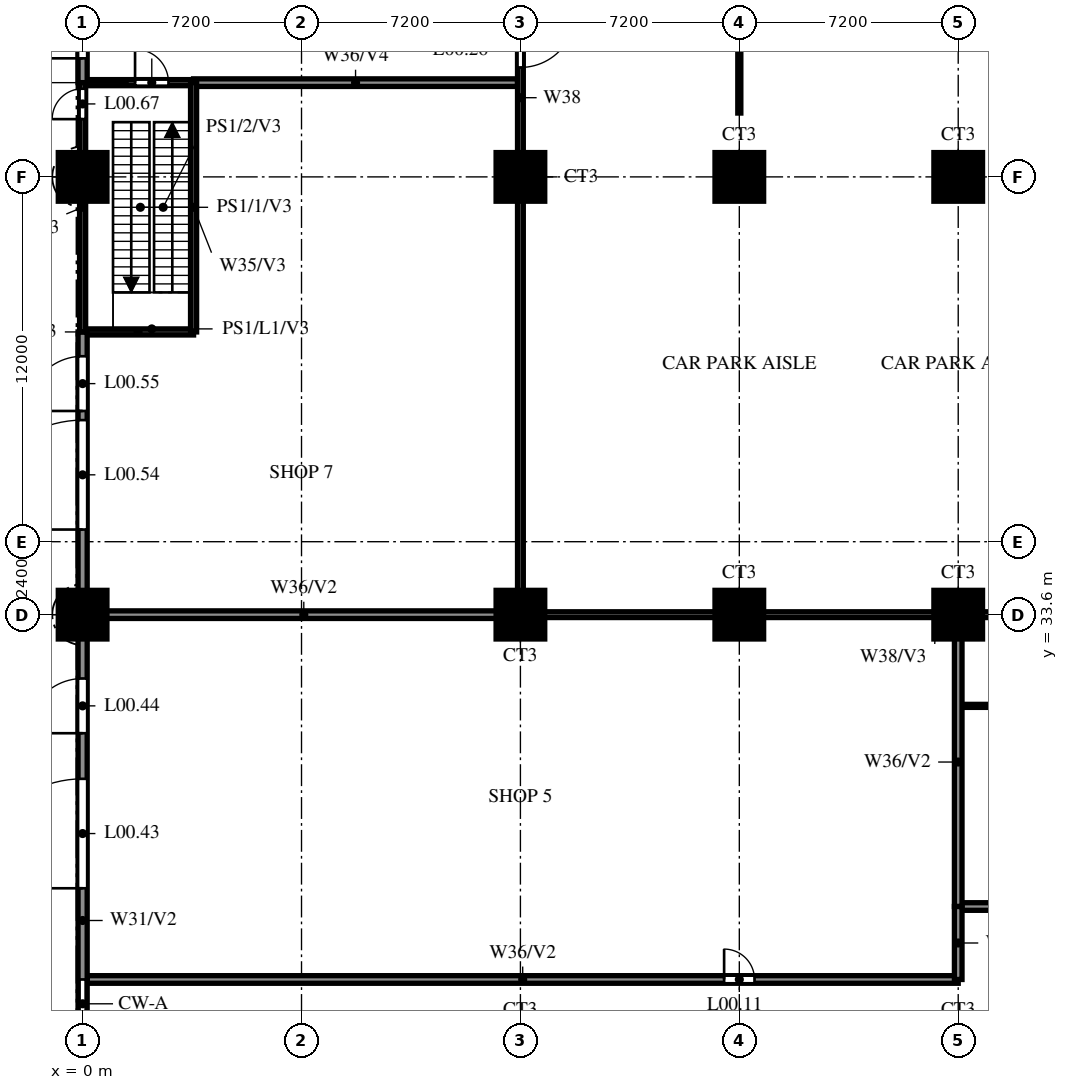
"""IFC4 building model, lengths in metres.
Left out: names, types, materials, properties, quantities, classifications, styles, units other than length and angle.
Written with IfcOpenShell. Run it as: python <this file> out.ifc"""

import sys

from ifc_helpers import new_model, si_unit, direction, frame, frame_2d, origin, origin_2d, place, context, subcontext, project, spatial, rectangle, circle, extrude, source, transform, mapped, element, fill, save


model = new_model("IFC4")
c1 = context("Model", 3, precision=1e-05, world=origin(), true_north=direction((0.0, 1.0)))
c2 = subcontext(c1, "Body", "Model", "MODEL_VIEW")
j1 = project(units=[si_unit("LENGTHUNIT", "METRE"), si_unit("PLANEANGLEUNIT", "RADIAN")], contexts=[c1])
p1 = place(None, origin())
s1 = spatial("IfcSite", under=j1, at=p1, CompositionType="ELEMENT")
p2 = place(p1, origin())
s2 = spatial("IfcBuilding", under=s1, at=p2, CompositionType="ELEMENT")
p3 = place(p2, origin())
s3 = spatial("IfcBuildingStorey", under=s2, at=p3, CompositionType="ELEMENT", Elevation=0.0)
m1 = source(origin(), c2, "Body", "SweptSolid", [
    extrude(circle(Radius=0.8, at=origin_2d()), origin(), (0.0, 0.0, 1.0), 7.4),
])
for number, where, z_axis, x_axis in (
    (1, (0.0, 33.6, 0.0), (0.0, 0.0, 1.0), (1.0, 0.0, 0.0)),
    (2, (14.4, 33.6, 0.0), (0.0, 0.0, 1.0), (1.0, 0.0, 0.0)),
    (3, (21.6, 33.6, 0.0), (0.0, 0.0, 1.0), (1.0, 0.0, 0.0)),
    (4, (28.8, 33.6, 0.0), (0.0, 0.0, 1.0), (1.0, 0.0, 0.0)),
    (5, (0.0, 48.0, 0.0), (0.0, 0.0, 1.0), (1.0, 0.0, 0.0)),
    (6, (14.4, 48.0, 0.0), (0.0, 0.0, 1.0), (1.0, 0.0, 0.0)),
    (7, (21.6, 48.0, 0.0), (0.0, 0.0, 1.0), (1.0, 0.0, 0.0)),
    (8, (28.8, 48.0, 0.0), (0.0, 0.0, 1.0), (1.0, 0.0, 0.0)),
):
    element("IfcColumn", number, at=place(p3, frame(where, z_axis=z_axis, x_axis=x_axis)), inside=s3, PredefinedType="COLUMN", context=c2, shape_type="MappedRepresentation", body=[
        mapped(m1, transform((0.0, 0.0, 0.0))),
    ])
p4 = place(p3, frame((0.15, 21.6, 0.0), z_axis=(0.0, 0.0, 1.0), x_axis=(1.0, 0.0, 0.0)))
e9 = element("IfcWall", 9, at=p4, inside=s3, PredefinedType="SOLIDWALL", context=c2, shape_type="SweptSolid", body=[
    extrude(rectangle(XDim=28.65, YDim=0.25, at=frame_2d((14.325, 0.0))), origin(), (0.0, 0.0, 1.0), 6.2),
])
p5 = place(p4, frame((20.95, 0.0, 0.0)))
e10 = element("IfcOpeningElement", 10, at=p5, cuts=e9, PredefinedType="OPENING", context=c2, shape_type="SweptSolid", body=[
    extrude(rectangle(XDim=1.0, YDim=2.1, at=frame_2d((0.5, 1.05))), frame((0.0, 0.135, 0.0), z_axis=(0.0, -1.0, 0.0), x_axis=(1.0, 0.0, 0.0)), (0.0, 0.0, 1.0), 0.27),
])
p6 = place(p3, frame((28.8, 24.0, 0.0), z_axis=(0.0, 0.0, 1.0), x_axis=(1.0, 0.0, 0.0)))
e11 = element("IfcWall", 11, at=p6, inside=s3, PredefinedType="SOLIDWALL", context=c2, shape_type="SweptSolid", body=[
    extrude(rectangle(XDim=14.4, YDim=0.25, at=frame_2d((7.2, 0.0))), origin(), (0.0, 0.0, 1.0), 6.2),
])
p7 = place(p6, frame((6.65, 0.0, 0.0)))
e12 = element("IfcOpeningElement", 12, at=p7, cuts=e11, PredefinedType="OPENING", context=c2, shape_type="SweptSolid", body=[
    extrude(rectangle(XDim=1.1, YDim=2.1, at=frame_2d((0.55, 1.05))), frame((0.0, 0.135, 0.0), z_axis=(0.0, -1.0, 0.0), x_axis=(1.0, 0.0, 0.0)), (0.0, 0.0, 1.0), 0.27),
])
p8 = place(p3, frame((28.925, 30.6, 0.0), z_axis=(0.0, 0.0, 1.0), x_axis=(1.0, 0.0, 0.0)))
e13 = element("IfcWall", 13, at=p8, inside=s3, PredefinedType="PARTITIONING", context=c2, shape_type="SweptSolid", body=[
    extrude(rectangle(XDim=4.625, YDim=0.1, at=frame_2d((2.312, 0.0))), origin(), (0.0, 0.0, 1.0), 7.4),
])
p9 = place(p3, frame((14.4, 33.6, 0.0), z_axis=(0.0, 0.0, 1.0), x_axis=(1.0, 0.0, 0.0)))
e14 = element("IfcWall", 14, at=p9, inside=s3, PredefinedType="PARTITIONING", context=c2, shape_type="SweptSolid", body=[
    extrude(rectangle(XDim=28.8, YDim=0.19, at=frame_2d((14.4, 0.0))), origin(), (0.0, 0.0, 1.0), 6.5),
])
p10 = place(p3, frame((0.15, 33.6, 0.0), z_axis=(0.0, 0.0, 1.0), x_axis=(1.0, 0.0, 0.0)))
e15 = element("IfcWall", 15, at=p10, inside=s3, PredefinedType="SOLIDWALL", context=c2, shape_type="SweptSolid", body=[
    extrude(rectangle(XDim=14.25, YDim=0.25, at=frame_2d((7.125, 0.0))), origin(), (0.0, 0.0, 1.0), 6.2),
])
p11 = place(p3, frame((0.0, 42.9, 0.0), z_axis=(0.0, 0.0, 1.0), x_axis=(1.0, 0.0, 0.0)))
e16 = element("IfcWall", 16, at=p11, inside=s3, PredefinedType="SOLIDWALL", context=c2, shape_type="SweptSolid", body=[
    extrude(rectangle(XDim=3.65, YDim=0.2, at=frame_2d((1.825, 0.0))), origin(), (0.0, 0.0, 1.0), 7.4),
])
p12 = place(p3, frame((3.65, 51.1, 0.0), z_axis=(0.0, 0.0, 1.0), x_axis=(1.0, 0.0, 0.0)))
e17 = element("IfcWall", 17, at=p12, inside=s3, PredefinedType="SOLIDWALL", context=c2, shape_type="SweptSolid", body=[
    extrude(rectangle(XDim=10.655, YDim=0.25, at=frame_2d((5.328, 0.0))), origin(), (0.0, 0.0, 1.0), 7.4),
])
p13 = place(p3, frame((0.0, 51.1, 0.0), z_axis=(0.0, 0.0, 1.0), x_axis=(1.0, 0.0, 0.0)))
e18 = element("IfcWall", 18, at=p13, inside=s3, PredefinedType="SOLIDWALL", context=c2, shape_type="SweptSolid", body=[
    extrude(rectangle(XDim=3.65, YDim=0.2, at=frame_2d((1.825, 0.0))), origin(), (0.0, 0.0, 1.0), 7.4),
])
p14 = place(p13, frame((1.725, 0.0, 0.0)))
e19 = element("IfcOpeningElement", 19, at=p14, cuts=e18, PredefinedType="OPENING", context=c2, shape_type="SweptSolid", body=[
    extrude(rectangle(XDim=1.1, YDim=2.1, at=frame_2d((0.55, 1.05))), frame((0.0, 0.11, 0.0), z_axis=(0.0, -1.0, 0.0), x_axis=(1.0, 0.0, 0.0)), (0.0, 0.0, 1.0), 0.22),
])
p15 = place(p3, frame((0.0, 7.7, 0.0), z_axis=(0.0, 0.0, 1.0), x_axis=(0.0, 1.0, 0.0)))
e20 = element("IfcWall", 20, at=p15, inside=s3, PredefinedType="SOLIDWALL", context=c2, shape_type="SweptSolid", body=[
    extrude(rectangle(XDim=35.2, YDim=0.3, at=frame_2d((17.6, 0.0))), origin(), (0.0, 0.0, 1.0), 7.4),
])
p16 = place(p15, frame((16.9, 0.0, 0.0)))
e21 = element("IfcOpeningElement", 21, at=p16, cuts=e20, PredefinedType="OPENING", context=c2, shape_type="SweptSolid", body=[
    extrude(rectangle(XDim=3.6, YDim=3.0, at=frame_2d((1.8, 1.5))), frame((0.0, 0.16, 0.0), z_axis=(0.0, -1.0, 0.0), x_axis=(1.0, 0.0, 0.0)), (0.0, 0.0, 1.0), 0.32),
])
p17 = place(p15, frame((22.0, 0.0, 0.0)))
e22 = element("IfcOpeningElement", 22, at=p17, cuts=e20, PredefinedType="OPENING", context=c2, shape_type="SweptSolid", body=[
    extrude(rectangle(XDim=1.8, YDim=2.1, at=frame_2d((0.9, 1.05))), frame((0.0, 0.16, 0.0), z_axis=(0.0, -1.0, 0.0), x_axis=(1.0, 0.0, 0.0)), (0.0, 0.0, 1.0), 0.32),
])
p18 = place(p15, frame((4.0, 0.0, 0.0)))
e23 = element("IfcOpeningElement", 23, at=p18, cuts=e20, PredefinedType="OPENING", context=c2, shape_type="SweptSolid", body=[
    extrude(rectangle(XDim=2.4, YDim=2.1, at=frame_2d((1.2, 1.05))), frame((0.0, 0.16, 0.0), z_axis=(0.0, -1.0, 0.0), x_axis=(1.0, 0.0, 0.0)), (0.0, 0.0, 1.0), 0.32),
])
p19 = place(p15, frame((7.0, 0.0, 0.0)))
e24 = element("IfcOpeningElement", 24, at=p19, cuts=e20, PredefinedType="OPENING", context=c2, shape_type="SweptSolid", body=[
    extrude(rectangle(XDim=2.4, YDim=2.1, at=frame_2d((1.2, 1.05))), frame((0.0, 0.16, 0.0), z_axis=(0.0, -1.0, 0.0), x_axis=(1.0, 0.0, 0.0)), (0.0, 0.0, 1.0), 0.32),
])
p20 = place(p15, frame((28.7, 0.0, 0.0)))
e25 = element("IfcOpeningElement", 25, at=p20, cuts=e20, PredefinedType="OPENING", context=c2, shape_type="SweptSolid", body=[
    extrude(rectangle(XDim=3.6, YDim=3.0, at=frame_2d((1.8, 1.5))), frame((0.0, 0.16, 0.0), z_axis=(0.0, -1.0, 0.0), x_axis=(1.0, 0.0, 0.0)), (0.0, 0.0, 1.0), 0.32),
])
p21 = place(p15, frame((32.6, 0.0, 0.0)))
e26 = element("IfcOpeningElement", 26, at=p21, cuts=e20, PredefinedType="OPENING", context=c2, shape_type="SweptSolid", body=[
    extrude(rectangle(XDim=1.8, YDim=2.1, at=frame_2d((0.9, 1.05))), frame((0.0, 0.16, 0.0), z_axis=(0.0, -1.0, 0.0), x_axis=(1.0, 0.0, 0.0)), (0.0, 0.0, 1.0), 0.32),
])
p22 = place(p3, frame((0.0, 51.1, 0.0), z_axis=(0.0, 0.0, 1.0), x_axis=(0.0, 1.0, 0.0)))
e27 = element("IfcWall", 27, at=p22, inside=s3, PredefinedType="SOLIDWALL", context=c2, shape_type="SweptSolid", body=[
    extrude(rectangle(XDim=3.2, YDim=0.3, at=frame_2d((1.6, 0.0))), origin(), (0.0, 0.0, 1.0), 7.4),
])
p23 = place(p22, frame((0.8, 0.0, 0.0)))
e28 = element("IfcOpeningElement", 28, at=p23, cuts=e27, PredefinedType="OPENING", context=c2, shape_type="SweptSolid", body=[
    extrude(rectangle(XDim=1.2, YDim=2.1, at=frame_2d((0.6, 1.05))), frame((0.0, 0.16, 0.0), z_axis=(0.0, -1.0, 0.0), x_axis=(1.0, 0.0, 0.0)), (0.0, 0.0, 1.0), 0.32),
])
p24 = place(p3, frame((0.0, 42.9, 0.0), z_axis=(0.0, 0.0, 1.0), x_axis=(0.0, 1.0, 0.0)))
e29 = element("IfcWall", 29, at=p24, inside=s3, PredefinedType="SOLIDWALL", context=c2, shape_type="SweptSolid", body=[
    extrude(rectangle(XDim=8.2, YDim=0.2, at=frame_2d((4.1, 0.0))), origin(), (0.0, 0.0, 1.0), 7.4),
])
p25 = place(p24, frame((7.0, 0.0, 0.0)))
e30 = element("IfcOpeningElement", 30, at=p25, cuts=e29, PredefinedType="OPENING", context=c2, shape_type="SweptSolid", body=[
    extrude(rectangle(XDim=1.0, YDim=2.1, at=frame_2d((0.5, 1.05))), frame((0.0, 0.11, 0.0), z_axis=(0.0, -1.0, 0.0), x_axis=(1.0, 0.0, 0.0)), (0.0, 0.0, 1.0), 0.22),
])
p26 = place(p3, frame((3.65, 42.9, 0.0), z_axis=(0.0, 0.0, 1.0), x_axis=(0.0, 1.0, 0.0)))
e31 = element("IfcWall", 31, at=p26, inside=s3, PredefinedType="SOLIDWALL", context=c2, shape_type="SweptSolid", body=[
    extrude(rectangle(XDim=8.2, YDim=0.2, at=frame_2d((4.1, 0.0))), origin(), (0.0, 0.0, 1.0), 7.4),
])
p27 = place(p3, frame((14.4, 69.4, 0.0), z_axis=(0.0, 0.0, 1.0), x_axis=(0.0, -1.0, 0.0)))
e32 = element("IfcWall", 32, at=p27, inside=s3, PredefinedType="PARTITIONING", context=c2, shape_type="SweptSolid", body=[
    extrude(rectangle(XDim=35.8, YDim=0.19, at=frame_2d((17.9, 0.0))), origin(), (0.0, 0.0, 1.0), 6.2),
])
p28 = place(p27, frame((16.0, 0.0, 0.0)))
e33 = element("IfcOpeningElement", 33, at=p28, cuts=e32, PredefinedType="OPENING", context=c2, shape_type="SweptSolid", body=[
    extrude(rectangle(XDim=1.8, YDim=2.1, at=frame_2d((0.9, 1.05))), frame((0.0, 0.105, 0.0), z_axis=(0.0, -1.0, 0.0), x_axis=(1.0, 0.0, 0.0)), (0.0, 0.0, 1.0), 0.21),
])
p29 = place(p27, frame((10.8, 0.0, 0.0)))
e34 = element("IfcOpeningElement", 34, at=p29, cuts=e32, PredefinedType="OPENING", context=c2, shape_type="SweptSolid", body=[
    extrude(rectangle(XDim=1.2, YDim=2.1, at=frame_2d((0.6, 1.05))), frame((0.0, 0.105, 0.0), z_axis=(0.0, -1.0, 0.0), x_axis=(1.0, 0.0, 0.0)), (0.0, 0.0, 1.0), 0.21),
])
p30 = place(p27, frame((1.0, 0.0, 0.0)))
e35 = element("IfcOpeningElement", 35, at=p30, cuts=e32, PredefinedType="OPENING", context=c2, shape_type="SweptSolid", body=[
    extrude(rectangle(XDim=1.0, YDim=2.1, at=frame_2d((0.5, 1.05))), frame((0.0, 0.105, 0.0), z_axis=(0.0, -1.0, 0.0), x_axis=(1.0, 0.0, 0.0)), (0.0, 0.0, 1.0), 0.21),
])
p31 = place(p3, frame((21.6, 50.1, 0.0), z_axis=(0.0, 0.0, 1.0), x_axis=(0.0, 1.0, 0.0)))
e36 = element("IfcWall", 36, at=p31, inside=s3, PredefinedType="PARTITIONING", context=c2, shape_type="SweptSolid", body=[
    extrude(rectangle(XDim=12.3, YDim=0.1, at=frame_2d((6.15, 0.0))), origin(), (0.0, 0.0, 1.0), 6.2),
])
p32 = place(p31, frame((5.0, 0.0, 0.0)))
e37 = element("IfcOpeningElement", 37, at=p32, cuts=e36, PredefinedType="OPENING", context=c2, shape_type="SweptSolid", body=[
    extrude(rectangle(XDim=2.0, YDim=2.1, at=frame_2d((1.0, 1.05))), frame((0.0, 0.06, 0.0), z_axis=(0.0, -1.0, 0.0), x_axis=(1.0, 0.0, 0.0)), (0.0, 0.0, 1.0), 0.12),
])
p33 = place(p3, frame((28.8, 24.0, 0.0), z_axis=(0.0, 0.0, 1.0), x_axis=(0.0, 1.0, 0.0)))
e38 = element("IfcWall", 38, at=p33, inside=s3, PredefinedType="SOLIDWALL", context=c2, shape_type="SweptSolid", body=[
    extrude(rectangle(XDim=9.505, YDim=0.25, at=frame_2d((4.752, 0.0))), origin(), (0.0, 0.0, 1.0), 6.2),
])
p34 = place(p3, frame((28.8, 21.6, 0.0), z_axis=(0.0, 0.0, 1.0), x_axis=(0.0, 1.0, 0.0)))
e39 = element("IfcWall", 39, at=p34, inside=s3, PredefinedType="SOLIDWALL", context=c2, shape_type="SweptSolid", body=[
    extrude(rectangle(XDim=2.4, YDim=0.25, at=frame_2d((1.2, 0.0))), origin(), (0.0, 0.0, 1.0), 6.2),
])
p35 = place(p5, origin())
e40 = element("IfcDoor", 40, at=p35, inside=s3, OperationType="SINGLE_SWING_RIGHT", PredefinedType="DOOR", context=c2, shape_type="SweptSolid", body=[
    extrude(rectangle(XDim=1.0, YDim=2.1, at=frame_2d((0.5, 1.05))), frame((0.0, 0.025, 0.0), z_axis=(0.0, -1.0, 0.0), x_axis=(1.0, 0.0, 0.0)), (0.0, 0.0, 1.0), 0.05),
])
fill(e10, e40)
p36 = place(p28, origin())
e41 = element("IfcDoor", 41, at=p36, inside=s3, OperationType="DOUBLE_DOOR_SINGLE_SWING", PredefinedType="DOOR", context=c2, shape_type="SweptSolid", body=[
    extrude(rectangle(XDim=1.8, YDim=2.1, at=frame_2d((0.9, 1.05))), frame((0.0, 0.025, 0.0), z_axis=(0.0, -1.0, 0.0), x_axis=(1.0, 0.0, 0.0)), (0.0, 0.0, 1.0), 0.05),
])
fill(e33, e41)
p37 = place(p14, origin())
e42 = element("IfcDoor", 42, at=p37, inside=s3, OperationType="SINGLE_SWING_RIGHT", PredefinedType="DOOR", context=c2, shape_type="SweptSolid", body=[
    extrude(rectangle(XDim=1.1, YDim=2.1, at=frame_2d((0.55, 1.05))), frame((0.0, 0.025, 0.0), z_axis=(0.0, -1.0, 0.0), x_axis=(1.0, 0.0, 0.0)), (0.0, 0.0, 1.0), 0.05),
])
fill(e19, e42)
p38 = place(p16, origin())
e43 = element("IfcDoor", 43, at=p38, inside=s3, OperationType="SINGLE_SWING_RIGHT", PredefinedType="DOOR", context=c2, shape_type="SweptSolid", body=[
    extrude(rectangle(XDim=3.6, YDim=3.0, at=frame_2d((1.8, 1.5))), frame((0.0, 0.025, 0.0), z_axis=(0.0, -1.0, 0.0), x_axis=(1.0, 0.0, 0.0)), (0.0, 0.0, 1.0), 0.05),
])
fill(e21, e43)
p39 = place(p17, origin())
e44 = element("IfcDoor", 44, at=p39, inside=s3, OperationType="DOUBLE_DOOR_SINGLE_SWING", PredefinedType="DOOR", context=c2, shape_type="SweptSolid", body=[
    extrude(rectangle(XDim=1.8, YDim=2.1, at=frame_2d((0.9, 1.05))), frame((0.0, 0.025, 0.0), z_axis=(0.0, -1.0, 0.0), x_axis=(1.0, 0.0, 0.0)), (0.0, 0.0, 1.0), 0.05),
])
fill(e22, e44)
p40 = place(p20, origin())
e45 = element("IfcDoor", 45, at=p40, inside=s3, OperationType="SINGLE_SWING_RIGHT", PredefinedType="DOOR", context=c2, shape_type="SweptSolid", body=[
    extrude(rectangle(XDim=3.6, YDim=3.0, at=frame_2d((1.8, 1.5))), frame((0.0, 0.025, 0.0), z_axis=(0.0, -1.0, 0.0), x_axis=(1.0, 0.0, 0.0)), (0.0, 0.0, 1.0), 0.05),
])
fill(e25, e45)
p41 = place(p21, origin())
e46 = element("IfcDoor", 46, at=p41, inside=s3, OperationType="DOUBLE_DOOR_SINGLE_SWING", PredefinedType="DOOR", context=c2, shape_type="SweptSolid", body=[
    extrude(rectangle(XDim=1.8, YDim=2.1, at=frame_2d((0.9, 1.05))), frame((0.0, 0.025, 0.0), z_axis=(0.0, -1.0, 0.0), x_axis=(1.0, 0.0, 0.0)), (0.0, 0.0, 1.0), 0.05),
])
fill(e26, e46)
p42 = place(p23, origin())
e47 = element("IfcDoor", 47, at=p42, inside=s3, OperationType="SINGLE_SWING_LEFT", PredefinedType="DOOR", context=c2, shape_type="SweptSolid", body=[
    extrude(rectangle(XDim=1.2, YDim=2.1, at=frame_2d((0.6, 1.05))), frame((0.0, 0.025, 0.0), z_axis=(0.0, -1.0, 0.0), x_axis=(1.0, 0.0, 0.0)), (0.0, 0.0, 1.0), 0.05),
])
fill(e28, e47)
p43 = place(p25, origin())
e48 = element("IfcDoor", 48, at=p43, inside=s3, OperationType="SINGLE_SWING_RIGHT", PredefinedType="DOOR", context=c2, shape_type="SweptSolid", body=[
    extrude(rectangle(XDim=1.0, YDim=2.1, at=frame_2d((0.5, 1.05))), frame((0.0, 0.025, 0.0), z_axis=(0.0, -1.0, 0.0), x_axis=(1.0, 0.0, 0.0)), (0.0, 0.0, 1.0), 0.05),
])
fill(e30, e48)
save(model, sys.argv[1])
